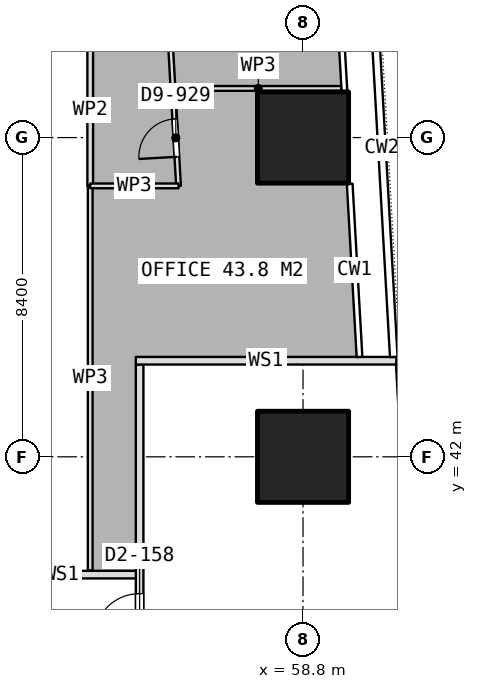
"""IFC4 building model, lengths in metres.
Left out: names, types, materials, properties, quantities, classifications, styles, units other than length and angle.
Written with IfcOpenShell. Run it as: python <this file> out.ifc"""

import sys

from ifc_helpers import new_model, si_unit, direction, frame, frame_2d, origin, origin_2d, place, context, subcontext, project, spatial, rectangle, extrude, element, fill, save


model = new_model("IFC4")
c1 = context("Model", 3, precision=1e-05, world=origin(), true_north=direction((0.0, 1.0)))
c2 = subcontext(c1, "Body", "Model", "MODEL_VIEW")
j1 = project(units=[si_unit("LENGTHUNIT", "METRE"), si_unit("PLANEANGLEUNIT", "RADIAN")], contexts=[c1])
p1 = place(None, origin())
s1 = spatial("IfcSite", under=j1, at=p1, CompositionType="ELEMENT")
p2 = place(p1, origin())
s2 = spatial("IfcBuilding", under=s1, at=p2, CompositionType="ELEMENT")
p3 = place(p2, frame((0.0, 0.0, 236.45)))
s3 = spatial("IfcBuildingStorey", under=s2, at=p3, CompositionType="ELEMENT", Elevation=236.45)
for number, where, z_axis, x_axis in (
    (1, (58.8, 42.0, 0.0), (0.0, 0.0, 1.0), (1.0, 0.0, 0.0)),
    (2, (58.8, 50.4, 0.0), (0.0, 0.0, 1.0), (1.0, 0.0, 0.0)),
):
    element("IfcColumn", number, at=place(p3, frame(where, z_axis=z_axis, x_axis=x_axis)), inside=s3, PredefinedType="COLUMN", context=c2, shape_type="SweptSolid", body=[
        extrude(rectangle(XDim=2.4, YDim=2.4, at=origin_2d()), origin(), (0.0, 0.0, 1.0), 3.75),
    ])
p4 = place(p3, frame((55.524, 49.129, 0.0), z_axis=(0.0, 0.0, 1.0), x_axis=(-0.056885044285, 0.998380734859, 0.0)))
e3 = element("IfcWall", 3, at=p4, inside=s3, PredefinedType="PARTITIONING", context=c2, shape_type="SweptSolid", body=[
    extrude(rectangle(XDim=2.532, YDim=0.125, at=frame_2d((1.266, 0.0))), origin(), (0.0, 0.0, 1.0), 3.4),
])
p5 = place(p4, frame((0.766, 0.0, 0.0)))
e4 = element("IfcOpeningElement", 4, at=p5, cuts=e3, PredefinedType="OPENING", context=c2, shape_type="SweptSolid", body=[
    extrude(rectangle(XDim=1.0, YDim=2.1, at=frame_2d((0.5, 1.05))), frame((0.0, 0.073, 0.0), z_axis=(0.0, -1.0, 0.0), x_axis=(1.0, 0.0, 0.0)), (0.0, 0.0, 1.0), 0.145),
])
p6 = place(p3, frame((55.441, 51.693, 0.0), z_axis=(0.0, 0.0, 1.0), x_axis=(1.0, 0.0, 0.0)))
e5 = element("IfcWall", 5, at=p6, inside=s3, PredefinedType="PARTITIONING", context=c2, shape_type="SweptSolid", body=[
    extrude(rectangle(XDim=4.365, YDim=0.125, at=frame_2d((2.183, 0.0))), origin(), (0.0, 0.0, 1.0), 3.4),
])
p7 = place(p3, frame((53.2, 39.011, 0.0), z_axis=(0.0, 0.0, 1.0), x_axis=(0.0, 1.0, 0.0)))
e6 = element("IfcWall", 6, at=p7, inside=s3, PredefinedType="PARTITIONING", context=c2, shape_type="SweptSolid", body=[
    extrude(rectangle(XDim=10.118, YDim=0.125, at=frame_2d((5.059, 0.0))), origin(), (0.0, 0.0, 1.0), 3.4),
])
p8 = place(p3, frame((53.2, 49.129, 0.0), z_axis=(0.0, 0.0, 1.0), x_axis=(1.0, 0.0, 0.0)))
e7 = element("IfcWall", 7, at=p8, inside=s3, PredefinedType="PARTITIONING", context=c2, shape_type="SweptSolid", body=[
    extrude(rectangle(XDim=2.324, YDim=0.125, at=frame_2d((1.162, 0.0))), origin(), (0.0, 0.0, 1.0), 3.4),
])
p9 = place(p3, frame((55.38, 51.658, 0.0), z_axis=(0.0, 0.0, 1.0), x_axis=(-0.056660197754, 0.998393520607, 0.0)))
e8 = element("IfcWall", 8, at=p9, inside=s3, PredefinedType="PARTITIONING", context=c2, shape_type="SweptSolid", body=[
    extrude(rectangle(XDim=4.783, YDim=0.125, at=frame_2d((2.391, 0.0))), origin(), (0.0, 0.0, 1.0), 3.4),
])
p10 = place(p3, frame((53.2, 49.129, 0.0), z_axis=(0.0, 0.0, 1.0), x_axis=(0.0, 1.0, 0.0)))
e9 = element("IfcWall", 9, at=p10, inside=s3, PredefinedType="PARTITIONING", context=c2, shape_type="SweptSolid", body=[
    extrude(rectangle(XDim=3.971, YDim=0.15, at=frame_2d((1.986, 0.0))), origin(), (0.0, 0.0, 1.0), 3.4),
])
p11 = place(p3, frame((54.5, 22.122, 0.0), z_axis=(0.0, 0.0, 1.0), x_axis=(0.0, 1.0, 0.0)))
e10 = element("IfcWall", 10, at=p11, inside=s3, PredefinedType="PARTITIONING", context=c2, shape_type="SweptSolid", body=[
    extrude(rectangle(XDim=22.306, YDim=0.2, at=frame_2d((11.153, 0.0))), origin(), (0.0, 0.0, 1.0), 3.4),
])
p12 = place(p11, frame((15.078, 0.0, 0.0)))
e11 = element("IfcOpeningElement", 11, at=p12, cuts=e10, PredefinedType="OPENING", context=c2, shape_type="SweptSolid", body=[
    extrude(rectangle(XDim=1.2, YDim=2.1, at=frame_2d((0.6, 1.05))), frame((0.0, 0.11, 0.0), z_axis=(0.0, -1.0, 0.0), x_axis=(1.0, 0.0, 0.0)), (0.0, 0.0, 1.0), 0.22),
])
p13 = place(p3, frame((54.4, 44.528, 0.0), z_axis=(0.0, 0.0, 1.0), x_axis=(1.0, 0.0, 0.0)))
e12 = element("IfcWall", 12, at=p13, inside=s3, PredefinedType="PARTITIONING", context=c2, shape_type="SweptSolid", body=[
    extrude(rectangle(XDim=6.854, YDim=0.2, at=frame_2d((3.427, 0.0))), origin(), (0.0, 0.0, 1.0), 3.4),
])
p14 = place(p3, frame((50.4, 38.9, 0.0), z_axis=(0.0, 0.0, 1.0), x_axis=(1.0, 0.0, 0.0)))
e13 = element("IfcWall", 13, at=p14, inside=s3, PredefinedType="PARTITIONING", context=c2, shape_type="SweptSolid", body=[
    extrude(rectangle(XDim=4.1, YDim=0.2, at=frame_2d((2.05, 0.0))), origin(), (0.0, 0.0, 1.0), 3.4),
])
p15 = place(p5, origin())
e14 = element("IfcDoor", 14, at=p15, inside=s3, OperationType="SINGLE_SWING_LEFT", PredefinedType="DOOR", context=c2, shape_type="SweptSolid", body=[
    extrude(rectangle(XDim=1.0, YDim=2.1, at=frame_2d((0.5, 1.05))), frame((0.0, 0.025, 0.0), z_axis=(0.0, -1.0, 0.0), x_axis=(1.0, 0.0, 0.0)), (0.0, 0.0, 1.0), 0.05),
])
fill(e4, e14)
p16 = place(p12, origin())
e15 = element("IfcDoor", 15, at=p16, inside=s3, OperationType="SINGLE_SWING_LEFT", PredefinedType="DOOR", context=c2, shape_type="SweptSolid", body=[
    extrude(rectangle(XDim=1.2, YDim=2.1, at=frame_2d((0.6, 1.05))), frame((0.0, 0.025, 0.0), z_axis=(0.0, -1.0, 0.0), x_axis=(1.0, 0.0, 0.0)), (0.0, 0.0, 1.0), 0.05),
])
fill(e11, e15)
save(model, sys.argv[1])
